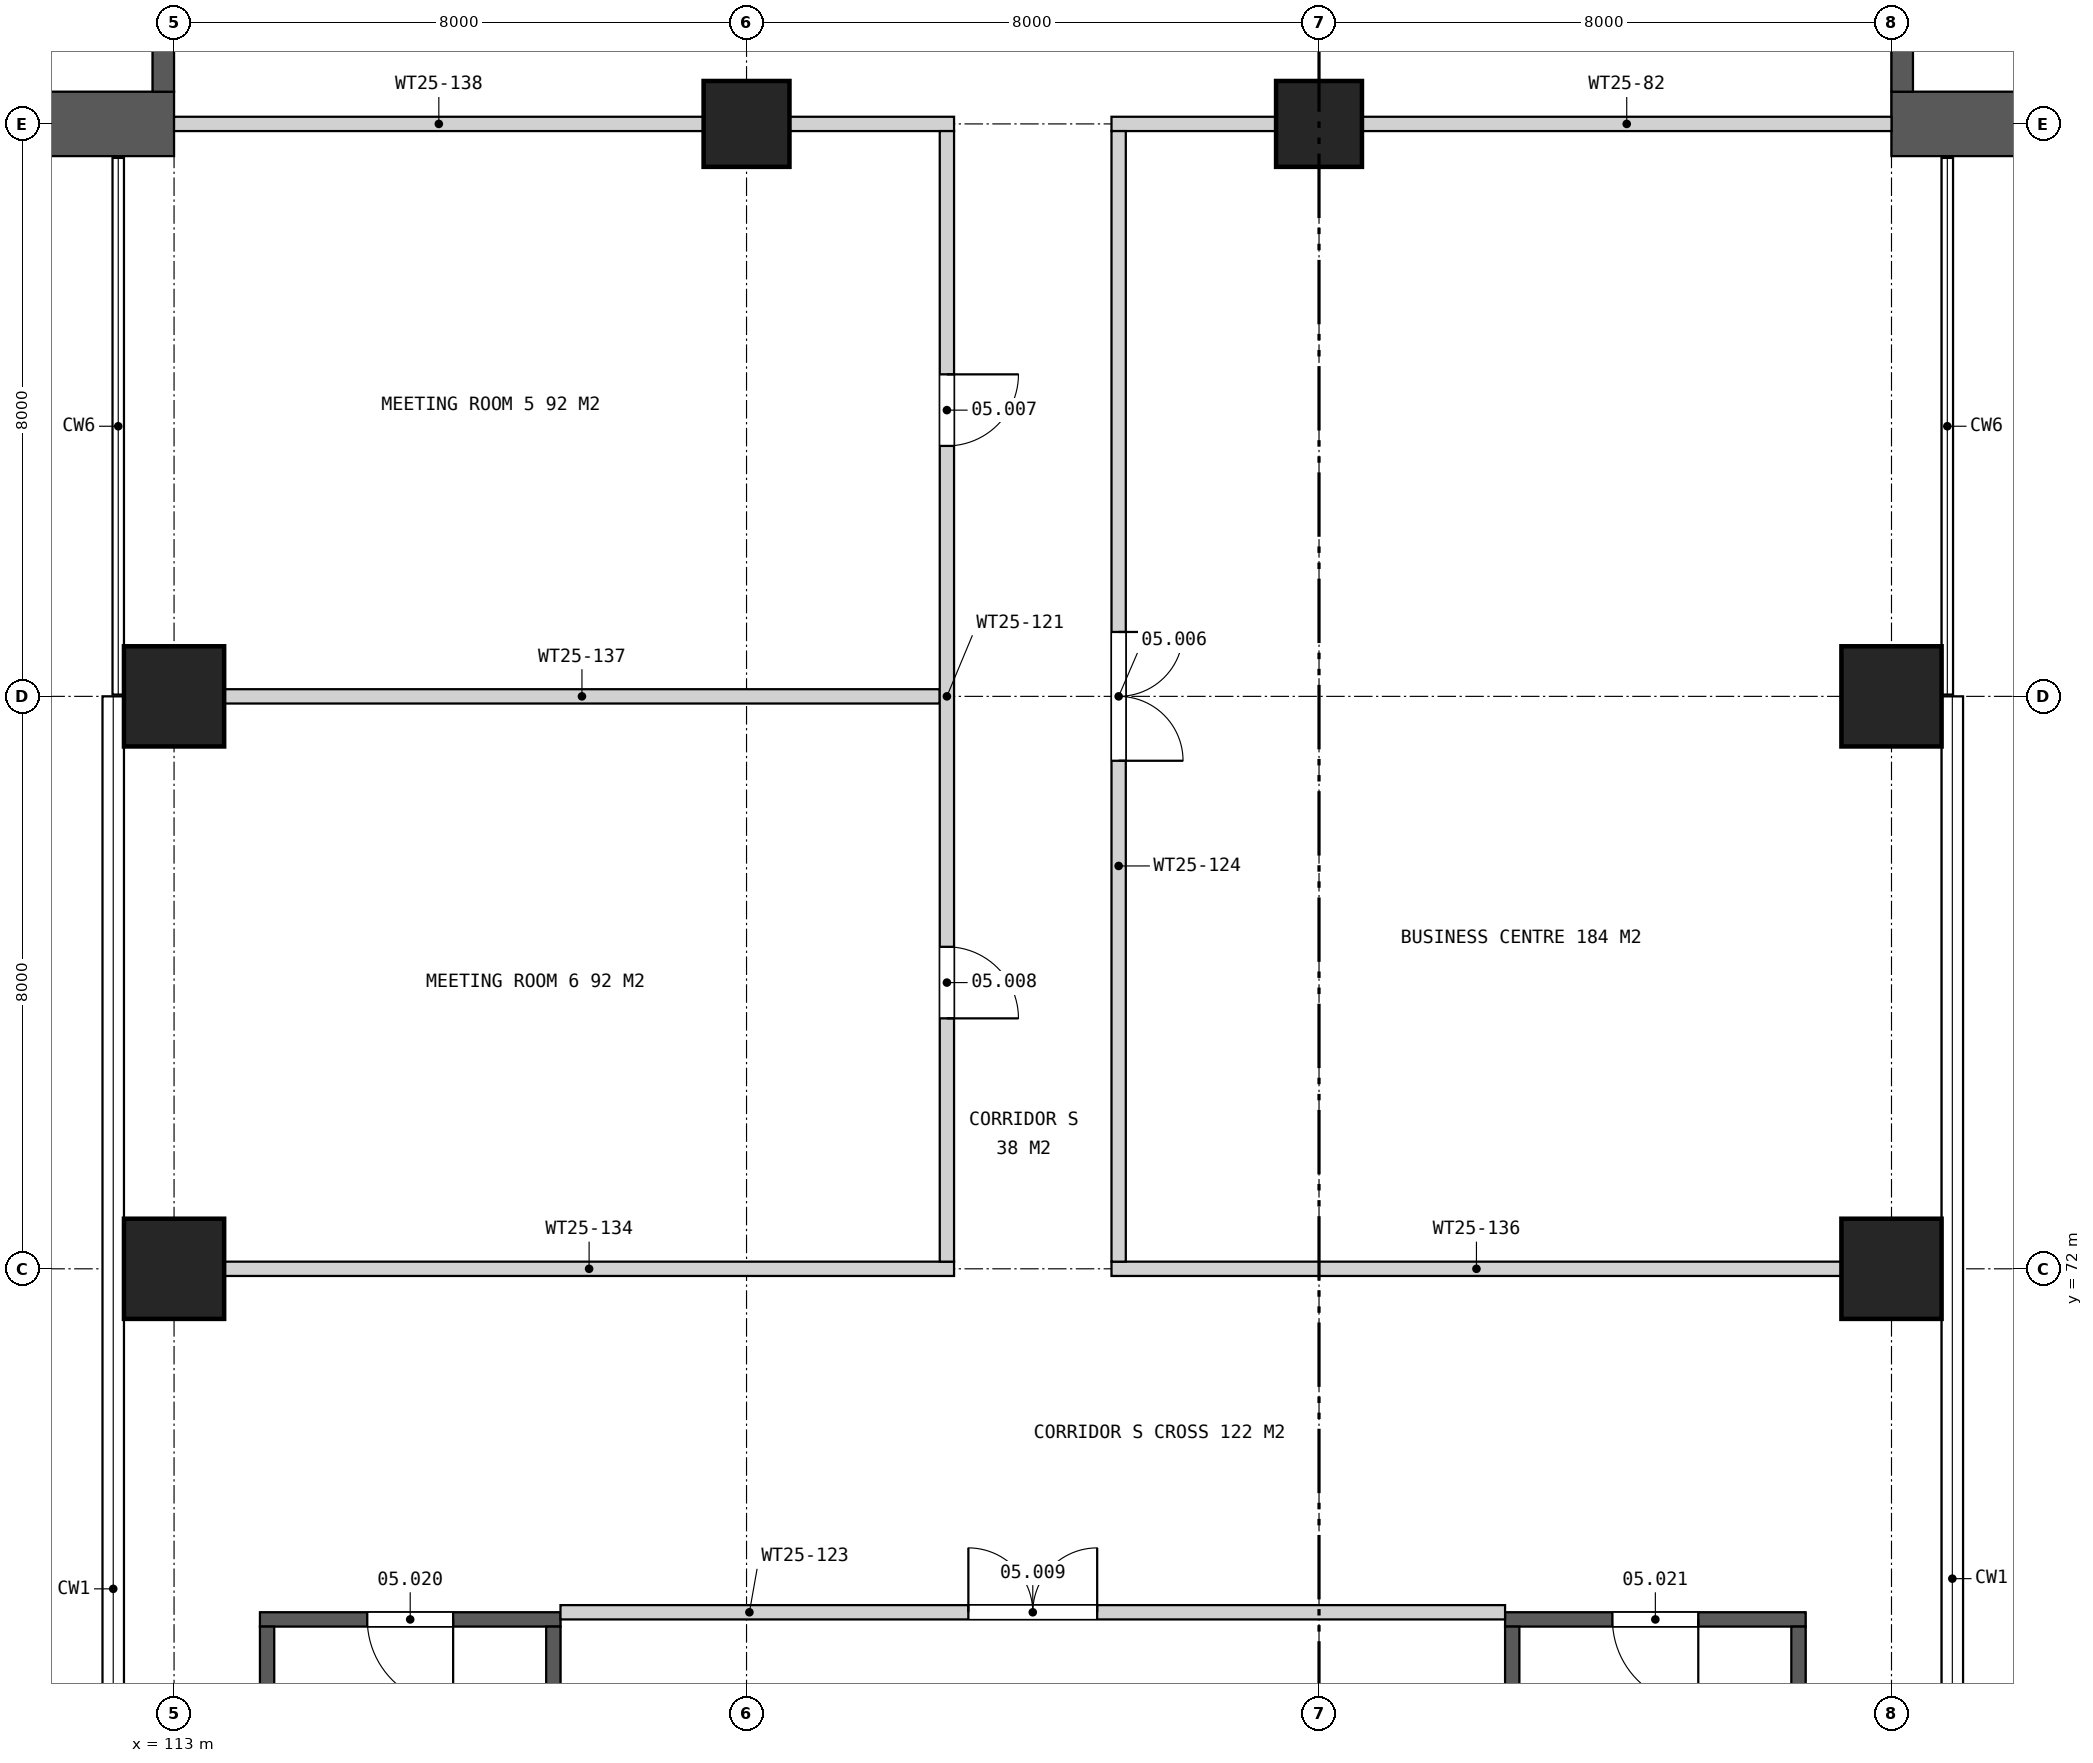
"""IFC4 building model, lengths in metres.
Left out: names, types, materials, properties, quantities, classifications, styles, units other than length and angle.
Written with IfcOpenShell. Run it as: python <this file> out.ifc"""

import sys

from ifc_helpers import new_model, si_unit, direction, frame, frame_2d, origin, origin_2d, place, context, subcontext, project, spatial, rectangle, extrude, element, fill, save


model = new_model("IFC4")
c1 = context("Model", 3, precision=1e-05, world=origin(), true_north=direction((0.0, 1.0)))
c2 = subcontext(c1, "Body", "Model", "MODEL_VIEW")
j1 = project(units=[si_unit("LENGTHUNIT", "METRE"), si_unit("PLANEANGLEUNIT", "RADIAN")], contexts=[c1])
p1 = place(None, origin())
s1 = spatial("IfcSite", under=j1, at=p1, CompositionType="ELEMENT")
p2 = place(p1, origin())
s2 = spatial("IfcBuilding", under=s1, at=p2, CompositionType="ELEMENT")
p3 = place(p2, frame((0.0, 0.0, 41.5)))
s3 = spatial("IfcBuildingStorey", under=s2, at=p3, CompositionType="ELEMENT", Elevation=41.5)
for number, where, z_axis, x_axis in (
    (1, (113.0, 72.0, 0.0), (0.0, 0.0, 1.0), (1.0, 0.0, 0.0)),
    (2, (113.0, 80.0, 0.0), (0.0, 0.0, 1.0), (1.0, 0.0, 0.0)),
):
    element("IfcColumn", number, at=place(p3, frame(where, z_axis=z_axis, x_axis=x_axis)), inside=s3, PredefinedType="COLUMN", context=c2, shape_type="SweptSolid", body=[
        extrude(rectangle(XDim=1.4, YDim=1.4, at=origin_2d()), origin(), (0.0, 0.0, 1.0), 6.0),
    ])
for number, where, z_axis, x_axis in (
    (3, (121.0, 88.0, 0.0), (0.0, 0.0, 1.0), (1.0, 0.0, 0.0)),
    (4, (129.0, 88.0, 0.0), (0.0, 0.0, 1.0), (1.0, 0.0, 0.0)),
):
    element("IfcColumn", number, at=place(p3, frame(where, z_axis=z_axis, x_axis=x_axis)), inside=s3, PredefinedType="COLUMN", context=c2, shape_type="SweptSolid", body=[
        extrude(rectangle(XDim=1.2, YDim=1.2, at=origin_2d()), origin(), (0.0, 0.0, 1.0), 6.0),
    ])
for number, where, z_axis, x_axis in (
    (5, (137.0, 72.0, 0.0), (0.0, 0.0, 1.0), (1.0, 0.0, 0.0)),
    (6, (137.0, 80.0, 0.0), (0.0, 0.0, 1.0), (1.0, 0.0, 0.0)),
):
    element("IfcColumn", number, at=place(p3, frame(where, z_axis=z_axis, x_axis=x_axis)), inside=s3, PredefinedType="COLUMN", context=c2, shape_type="SweptSolid", body=[
        extrude(rectangle(XDim=1.4, YDim=1.4, at=origin_2d()), origin(), (0.0, 0.0, 1.0), 6.0),
    ])
p4 = place(p3, frame((137.0, 88.0, 0.0), z_axis=(0.0, 0.0, 1.0), x_axis=(1.0, 0.0, 0.0)))
e7 = element("IfcWall", 7, at=p4, inside=s3, PredefinedType="SHEAR", context=c2, shape_type="SweptSolid", body=[
    extrude(rectangle(XDim=7.1, YDim=0.9, at=frame_2d((3.55, 0.0))), origin(), (0.0, 0.0, 1.0), 6.0),
])
p5 = place(p3, frame((137.15, 88.45, 0.0), z_axis=(0.0, 0.0, 1.0), x_axis=(0.0, 1.0, 0.0)))
e8 = element("IfcWall", 8, at=p5, inside=s3, PredefinedType="SHEAR", context=c2, shape_type="SweptSolid", body=[
    extrude(rectangle(XDim=5.85, YDim=0.3, at=frame_2d((2.925, 0.0))), origin(), (0.0, 0.0, 1.0), 6.0),
])
p6 = place(p3, frame((113.0, 88.0, 0.0), z_axis=(0.0, 0.0, 1.0), x_axis=(-1.0, 0.0, 0.0)))
e9 = element("IfcWall", 9, at=p6, inside=s3, PredefinedType="SHEAR", context=c2, shape_type="SweptSolid", body=[
    extrude(rectangle(XDim=7.1, YDim=0.9, at=frame_2d((3.55, 0.0))), origin(), (0.0, 0.0, 1.0), 6.0),
])
p7 = place(p3, frame((112.85, 94.3, 0.0), z_axis=(0.0, 0.0, 1.0), x_axis=(0.0, -1.0, 0.0)))
e10 = element("IfcWall", 10, at=p7, inside=s3, PredefinedType="SHEAR", context=c2, shape_type="SweptSolid", body=[
    extrude(rectangle(XDim=5.85, YDim=0.3, at=frame_2d((2.925, 0.0))), origin(), (0.0, 0.0, 1.0), 6.0),
])
p8 = place(p3, frame((114.2, 67.1, 0.0), z_axis=(0.0, 0.0, 1.0), x_axis=(1.0, 0.0, 0.0)))
e11 = element("IfcWall", 11, at=p8, inside=s3, PredefinedType="SOLIDWALL", context=c2, shape_type="SweptSolid", body=[
    extrude(rectangle(XDim=4.2, YDim=0.2, at=frame_2d((2.1, 0.0))), origin(), (0.0, 0.0, 1.0), 6.0),
])
p9 = place(p8, frame((1.5, 0.0, 0.0)))
e12 = element("IfcOpeningElement", 12, at=p9, cuts=e11, PredefinedType="OPENING", context=c2, shape_type="SweptSolid", body=[
    extrude(rectangle(XDim=1.2, YDim=2.2, at=frame_2d((0.6, 1.1))), frame((0.0, 0.11, 0.0), z_axis=(0.0, -1.0, 0.0), x_axis=(1.0, 0.0, 0.0)), (0.0, 0.0, 1.0), 0.22),
])
p10 = place(p3, frame((131.6, 67.1, 0.0), z_axis=(0.0, 0.0, 1.0), x_axis=(1.0, 0.0, 0.0)))
e13 = element("IfcWall", 13, at=p10, inside=s3, PredefinedType="SOLIDWALL", context=c2, shape_type="SweptSolid", body=[
    extrude(rectangle(XDim=4.2, YDim=0.2, at=frame_2d((2.1, 0.0))), origin(), (0.0, 0.0, 1.0), 6.0),
])
p11 = place(p10, frame((1.5, 0.0, 0.0)))
e14 = element("IfcOpeningElement", 14, at=p11, cuts=e13, PredefinedType="OPENING", context=c2, shape_type="SweptSolid", body=[
    extrude(rectangle(XDim=1.2, YDim=2.2, at=frame_2d((0.6, 1.1))), frame((0.0, 0.11, 0.0), z_axis=(0.0, -1.0, 0.0), x_axis=(1.0, 0.0, 0.0)), (0.0, 0.0, 1.0), 0.22),
])
p12 = place(p3, frame((118.4, 67.2, 0.0), z_axis=(0.0, 0.0, 1.0), x_axis=(1.0, 0.0, 0.0)))
e15 = element("IfcWall", 15, at=p12, inside=s3, PredefinedType="PARTITIONING", context=c2, shape_type="SweptSolid", body=[
    extrude(rectangle(XDim=13.2, YDim=0.2, at=frame_2d((6.6, 0.0))), origin(), (0.0, 0.0, 1.0), 5.143),
])
p13 = place(p12, frame((5.7, 0.0, 0.0)))
e16 = element("IfcOpeningElement", 16, at=p13, cuts=e15, PredefinedType="OPENING", context=c2, shape_type="SweptSolid", body=[
    extrude(rectangle(XDim=1.8, YDim=2.4, at=frame_2d((0.9, 1.2))), frame((0.0, 0.11, 0.0), z_axis=(0.0, -1.0, 0.0), x_axis=(1.0, 0.0, 0.0)), (0.0, 0.0, 1.0), 0.22),
])
for number, where, z_axis, x_axis in (
    (17, (113.7, 72.0, 0.0), (0.0, 0.0, 1.0), (1.0, 0.0, 0.0)),
    (18, (126.1, 72.0, 0.0), (0.0, 0.0, 1.0), (1.0, 0.0, 0.0)),
):
    element("IfcWall", number, at=place(p3, frame(where, z_axis=z_axis, x_axis=x_axis)), inside=s3, PredefinedType="PARTITIONING", context=c2, shape_type="SweptSolid", body=[
        extrude(rectangle(XDim=10.2, YDim=0.2, at=frame_2d((5.1, 0.0))), origin(), (0.0, 0.0, 1.0), 4.1),
    ])
p14 = place(p3, frame((113.7, 80.0, 0.0), z_axis=(0.0, 0.0, 1.0), x_axis=(1.0, 0.0, 0.0)))
e19 = element("IfcWall", 19, at=p14, inside=s3, PredefinedType="PARTITIONING", context=c2, shape_type="SweptSolid", body=[
    extrude(rectangle(XDim=10.0, YDim=0.2, at=frame_2d((5.0, 0.0))), origin(), (0.0, 0.0, 1.0), 4.1),
])
p15 = place(p3, frame((113.0, 88.0, 0.0), z_axis=(0.0, 0.0, 1.0), x_axis=(1.0, 0.0, 0.0)))
e20 = element("IfcWall", 20, at=p15, inside=s3, PredefinedType="PARTITIONING", context=c2, shape_type="SweptSolid", body=[
    extrude(rectangle(XDim=7.4, YDim=0.2, at=frame_2d((3.7, 0.0))), origin(), (0.0, 0.0, 1.0), 5.055),
])
for number, where, z_axis, x_axis in (
    (21, (121.6, 88.0, 0.0), (0.0, 0.0, 1.0), (1.0, 0.0, 0.0)),
    (22, (126.1, 88.0, 0.0), (0.0, 0.0, 1.0), (1.0, 0.0, 0.0)),
):
    element("IfcWall", number, at=place(p3, frame(where, z_axis=z_axis, x_axis=x_axis)), inside=s3, PredefinedType="PARTITIONING", context=c2, shape_type="SweptSolid", body=[
        extrude(rectangle(XDim=2.3, YDim=0.2, at=frame_2d((1.15, 0.0))), origin(), (0.0, 0.0, 1.0), 5.061),
    ])
p16 = place(p3, frame((129.6, 88.0, 0.0), z_axis=(0.0, 0.0, 1.0), x_axis=(1.0, 0.0, 0.0)))
e23 = element("IfcWall", 23, at=p16, inside=s3, PredefinedType="PARTITIONING", context=c2, shape_type="SweptSolid", body=[
    extrude(rectangle(XDim=7.4, YDim=0.2, at=frame_2d((3.7, 0.0))), origin(), (0.0, 0.0, 1.0), 5.055),
])
for number, where, z_axis, x_axis in (
    (24, (114.3, 55.4, 0.0), (0.0, 0.0, 1.0), (0.0, 1.0, 0.0)),
    (25, (118.3, 55.4, 0.0), (0.0, 0.0, 1.0), (0.0, 1.0, 0.0)),
):
    element("IfcWall", number, at=place(p3, frame(where, z_axis=z_axis, x_axis=x_axis)), inside=s3, PredefinedType="SOLIDWALL", context=c2, shape_type="SweptSolid", body=[
        extrude(rectangle(XDim=11.6, YDim=0.2, at=frame_2d((5.8, 0.0))), origin(), (0.0, 0.0, 1.0), 6.0),
    ])
p17 = place(p3, frame((123.8, 72.1, 0.0), z_axis=(0.0, 0.0, 1.0), x_axis=(0.0, 1.0, 0.0)))
e26 = element("IfcWall", 26, at=p17, inside=s3, PredefinedType="PARTITIONING", context=c2, shape_type="SweptSolid", body=[
    extrude(rectangle(XDim=15.8, YDim=0.2, at=frame_2d((7.9, 0.0))), origin(), (0.0, 0.0, 1.0), 4.1),
])
p18 = place(p17, frame((11.4, 0.0, 0.0)))
e27 = element("IfcOpeningElement", 27, at=p18, cuts=e26, PredefinedType="OPENING", context=c2, shape_type="SweptSolid", body=[
    extrude(rectangle(XDim=1.0, YDim=2.1, at=frame_2d((0.5, 1.05))), frame((0.0, 0.11, 0.0), z_axis=(0.0, -1.0, 0.0), x_axis=(1.0, 0.0, 0.0)), (0.0, 0.0, 1.0), 0.22),
])
p19 = place(p17, frame((3.4, 0.0, 0.0)))
e28 = element("IfcOpeningElement", 28, at=p19, cuts=e26, PredefinedType="OPENING", context=c2, shape_type="SweptSolid", body=[
    extrude(rectangle(XDim=1.0, YDim=2.1, at=frame_2d((0.5, 1.05))), frame((0.0, 0.11, 0.0), z_axis=(0.0, -1.0, 0.0), x_axis=(1.0, 0.0, 0.0)), (0.0, 0.0, 1.0), 0.22),
])
p20 = place(p3, frame((126.2, 72.1, 0.0), z_axis=(0.0, 0.0, 1.0), x_axis=(0.0, 1.0, 0.0)))
e29 = element("IfcWall", 29, at=p20, inside=s3, PredefinedType="PARTITIONING", context=c2, shape_type="SweptSolid", body=[
    extrude(rectangle(XDim=15.8, YDim=0.2, at=frame_2d((7.9, 0.0))), origin(), (0.0, 0.0, 1.0), 4.1),
])
p21 = place(p20, frame((7.0, 0.0, 0.0)))
e30 = element("IfcOpeningElement", 30, at=p21, cuts=e29, PredefinedType="OPENING", context=c2, shape_type="SweptSolid", body=[
    extrude(rectangle(XDim=1.8, YDim=2.4, at=frame_2d((0.9, 1.2))), frame((0.0, 0.11, 0.0), z_axis=(0.0, -1.0, 0.0), x_axis=(1.0, 0.0, 0.0)), (0.0, 0.0, 1.0), 0.22),
])
for number, where, z_axis, x_axis in (
    (31, (131.7, 55.4, 0.0), (0.0, 0.0, 1.0), (0.0, 1.0, 0.0)),
    (32, (135.7, 55.4, 0.0), (0.0, 0.0, 1.0), (0.0, 1.0, 0.0)),
):
    element("IfcWall", number, at=place(p3, frame(where, z_axis=z_axis, x_axis=x_axis)), inside=s3, PredefinedType="SOLIDWALL", context=c2, shape_type="SweptSolid", body=[
        extrude(rectangle(XDim=11.6, YDim=0.2, at=frame_2d((5.8, 0.0))), origin(), (0.0, 0.0, 1.0), 6.0),
    ])
p22 = place(p21, frame((1.8, 0.0, 0.0), z_axis=(0.0, 0.0, 1.0), x_axis=(-1.0, 0.0, 0.0)))
e33 = element("IfcDoor", 33, at=p22, inside=s3, OperationType="DOUBLE_DOOR_SINGLE_SWING", PredefinedType="DOOR", context=c2, shape_type="SweptSolid", body=[
    extrude(rectangle(XDim=1.8, YDim=2.4, at=frame_2d((0.9, 1.2))), frame((0.0, 0.025, 0.0), z_axis=(0.0, -1.0, 0.0), x_axis=(1.0, 0.0, 0.0)), (0.0, 0.0, 1.0), 0.05),
])
fill(e30, e33)
p23 = place(p18, frame((1.0, 0.0, 0.0), z_axis=(0.0, 0.0, 1.0), x_axis=(-1.0, 0.0, 0.0)))
e34 = element("IfcDoor", 34, at=p23, inside=s3, OperationType="SINGLE_SWING_LEFT", PredefinedType="DOOR", context=c2, shape_type="SweptSolid", body=[
    extrude(rectangle(XDim=1.0, YDim=2.1, at=frame_2d((0.5, 1.05))), frame((0.0, 0.025, 0.0), z_axis=(0.0, -1.0, 0.0), x_axis=(1.0, 0.0, 0.0)), (0.0, 0.0, 1.0), 0.05),
])
fill(e27, e34)
p24 = place(p19, frame((1.0, 0.0, 0.0), z_axis=(0.0, 0.0, 1.0), x_axis=(-1.0, 0.0, 0.0)))
e35 = element("IfcDoor", 35, at=p24, inside=s3, OperationType="SINGLE_SWING_RIGHT", PredefinedType="DOOR", context=c2, shape_type="SweptSolid", body=[
    extrude(rectangle(XDim=1.0, YDim=2.1, at=frame_2d((0.5, 1.05))), frame((0.0, 0.025, 0.0), z_axis=(0.0, -1.0, 0.0), x_axis=(1.0, 0.0, 0.0)), (0.0, 0.0, 1.0), 0.05),
])
fill(e28, e35)
p25 = place(p13, origin())
e36 = element("IfcDoor", 36, at=p25, inside=s3, OperationType="DOUBLE_DOOR_SINGLE_SWING", PredefinedType="DOOR", context=c2, shape_type="SweptSolid", body=[
    extrude(rectangle(XDim=1.8, YDim=2.4, at=frame_2d((0.9, 1.2))), frame((0.0, 0.025, 0.0), z_axis=(0.0, -1.0, 0.0), x_axis=(1.0, 0.0, 0.0)), (0.0, 0.0, 1.0), 0.05),
])
fill(e16, e36)
p26 = place(p9, frame((1.2, 0.0, 0.0), z_axis=(0.0, 0.0, 1.0), x_axis=(-1.0, 0.0, 0.0)))
e37 = element("IfcDoor", 37, at=p26, inside=s3, OperationType="SINGLE_SWING_LEFT", PredefinedType="DOOR", context=c2, shape_type="SweptSolid", body=[
    extrude(rectangle(XDim=1.2, YDim=2.2, at=frame_2d((0.6, 1.1))), frame((0.0, 0.025, 0.0), z_axis=(0.0, -1.0, 0.0), x_axis=(1.0, 0.0, 0.0)), (0.0, 0.0, 1.0), 0.05),
])
fill(e12, e37)
p27 = place(p11, frame((1.2, 0.0, 0.0), z_axis=(0.0, 0.0, 1.0), x_axis=(-1.0, 0.0, 0.0)))
e38 = element("IfcDoor", 38, at=p27, inside=s3, OperationType="SINGLE_SWING_LEFT", PredefinedType="DOOR", context=c2, shape_type="SweptSolid", body=[
    extrude(rectangle(XDim=1.2, YDim=2.2, at=frame_2d((0.6, 1.1))), frame((0.0, 0.025, 0.0), z_axis=(0.0, -1.0, 0.0), x_axis=(1.0, 0.0, 0.0)), (0.0, 0.0, 1.0), 0.05),
])
fill(e14, e38)
save(model, sys.argv[1])
